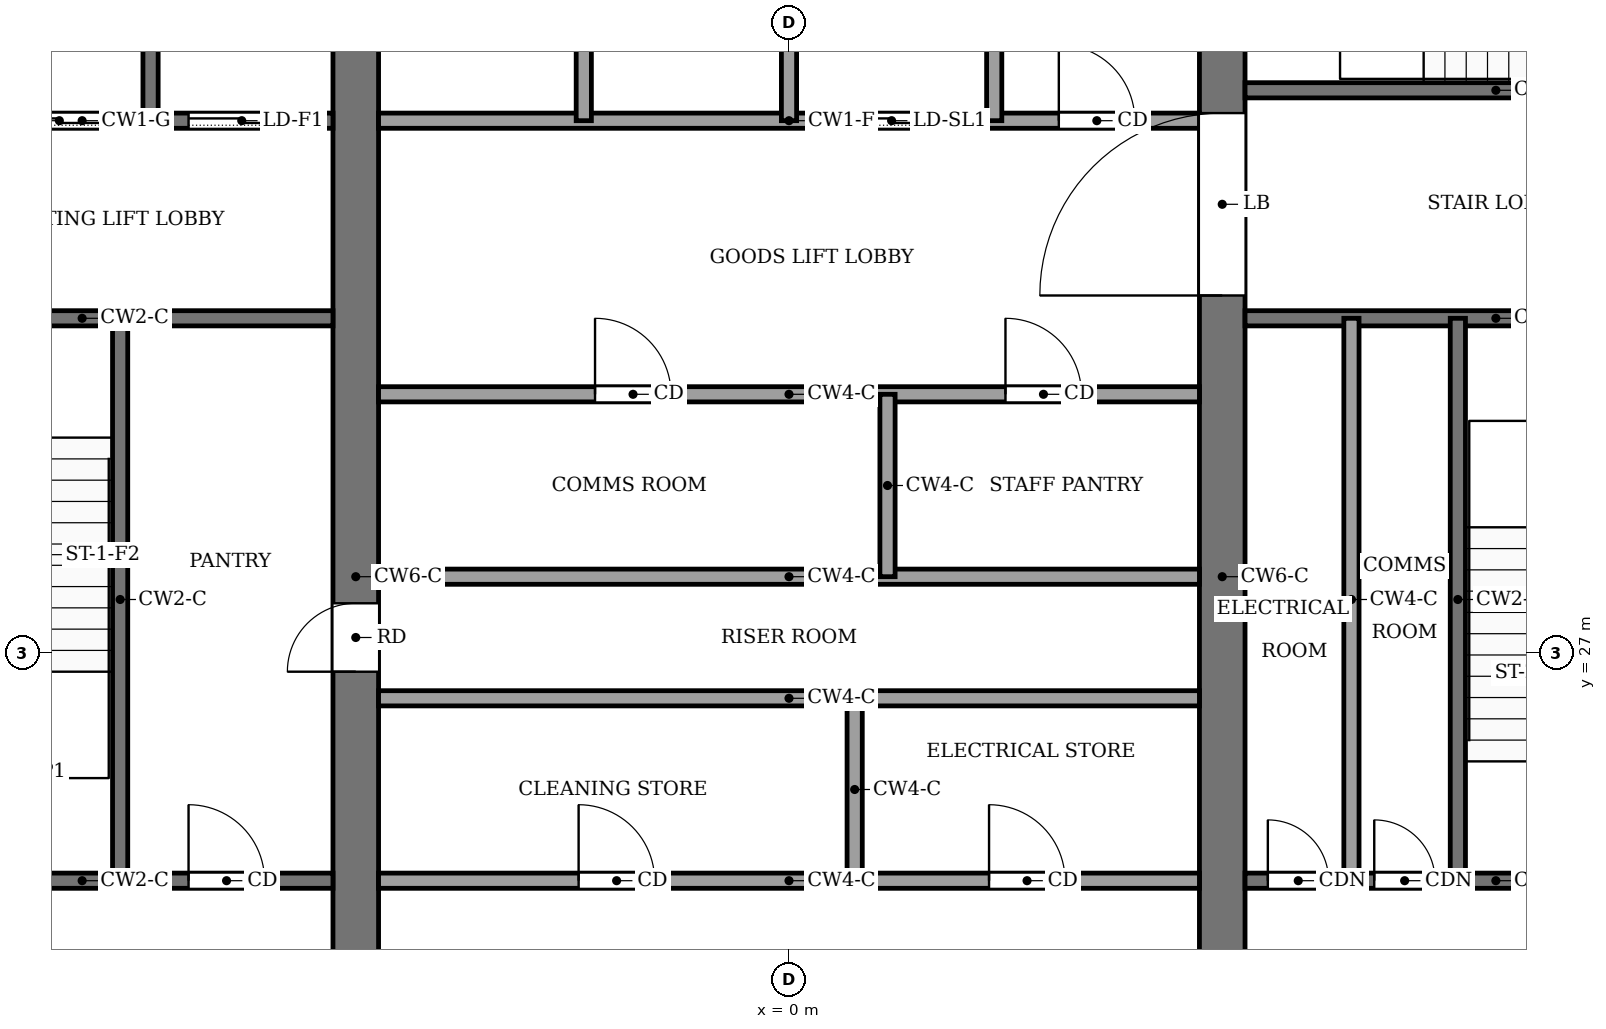
"""IFC4 building model, lengths in metres.
Left out: names, types, materials, properties, quantities, classifications, styles, units other than length and angle.
Written with IfcOpenShell. Run it as: python <this file> out.ifc"""

import sys

from ifc_helpers import new_model, si_unit, direction, frame, frame_2d, origin, place, context, subcontext, project, spatial, rectangle, extrude, element, fill, save


model = new_model("IFC4")
c1 = context("Model", 3, precision=1e-05, world=origin(), true_north=direction((0.0, 1.0)))
c2 = subcontext(c1, "Body", "Model", "MODEL_VIEW")
j1 = project(units=[si_unit("LENGTHUNIT", "METRE"), si_unit("PLANEANGLEUNIT", "RADIAN")], contexts=[c1])
p1 = place(None, origin())
s1 = spatial("IfcSite", under=j1, at=p1, CompositionType="ELEMENT")
p2 = place(p1, origin())
s2 = spatial("IfcBuilding", under=s1, at=p2, CompositionType="ELEMENT")
p3 = place(p2, frame((0.0, 0.0, 294.0)))
s3 = spatial("IfcBuildingStorey", under=s2, at=p3, CompositionType="ELEMENT", Elevation=294.0)
p4 = place(p3, frame((-5.7, 18.4, -0.13), z_axis=(0.0, 0.0, 1.0), x_axis=(0.0, 1.0, 0.0)))
e1 = element("IfcWall", 1, at=p4, inside=s3, PredefinedType="SHEAR", context=c2, shape_type="SweptSolid", body=[
    extrude(rectangle(XDim=19.2, YDim=0.6, at=frame_2d((9.6, 0.0))), origin(), (0.0, 0.0, 1.0), 4.0),
])
p5 = place(p4, frame((8.35, 0.0, 0.13)))
e2 = element("IfcOpeningElement", 2, at=p5, cuts=e1, PredefinedType="OPENING", context=c2, shape_type="SweptSolid", body=[
    extrude(rectangle(XDim=0.9, YDim=2.1, at=frame_2d((0.45, 1.05))), frame((0.0, 0.31, 0.0), z_axis=(0.0, -1.0, 0.0), x_axis=(1.0, 0.0, 0.0)), (0.0, 0.0, 1.0), 0.62),
])
p6 = place(p3, frame((5.7, 18.4, -0.13), z_axis=(0.0, 0.0, 1.0), x_axis=(0.0, 1.0, 0.0)))
e3 = element("IfcWall", 3, at=p6, inside=s3, PredefinedType="SHEAR", context=c2, shape_type="SweptSolid", body=[
    extrude(rectangle(XDim=19.2, YDim=0.6, at=frame_2d((9.6, 0.0))), origin(), (0.0, 0.0, 1.0), 4.0),
])
p7 = place(p6, frame((13.3, 0.0, 0.13)))
e4 = element("IfcOpeningElement", 4, at=p7, cuts=e3, PredefinedType="OPENING", context=c2, shape_type="SweptSolid", body=[
    extrude(rectangle(XDim=2.4, YDim=2.4, at=frame_2d((1.2, 1.2))), frame((0.0, 0.31, 0.0), z_axis=(0.0, -1.0, 0.0), x_axis=(1.0, 0.0, 0.0)), (0.0, 0.0, 1.0), 0.62),
])
p8 = place(p3, frame((-12.6, 24.0, 0.0), z_axis=(0.0, 0.0, 1.0), x_axis=(1.0, 0.0, 0.0)))
e5 = element("IfcWall", 5, at=p8, inside=s3, PredefinedType="PARTITIONING", context=c2, shape_type="SweptSolid", body=[
    extrude(rectangle(XDim=6.6, YDim=0.2, at=frame_2d((3.3, 0.0))), origin(), (0.0, 0.0, 1.0), 3.87),
])
p9 = place(p8, frame((4.7, 0.0, 0.0)))
e6 = element("IfcOpeningElement", 6, at=p9, cuts=e5, PredefinedType="OPENING", context=c2, shape_type="SweptSolid", body=[
    extrude(rectangle(XDim=1.0, YDim=2.1, at=frame_2d((0.5, 1.05))), frame((0.0, 0.11, 0.0), z_axis=(0.0, -1.0, 0.0), x_axis=(1.0, 0.0, 0.0)), (0.0, 0.0, 1.0), 0.22),
])
p10 = place(p3, frame((-5.4, 24.0, 0.0), z_axis=(0.0, 0.0, 1.0), x_axis=(1.0, 0.0, 0.0)))
e7 = element("IfcWall", 7, at=p10, inside=s3, PredefinedType="PARTITIONING", context=c2, shape_type="SweptSolid", body=[
    extrude(rectangle(XDim=10.8, YDim=0.2, at=frame_2d((5.4, 0.0))), origin(), (0.0, 0.0, 1.0), 3.87),
])
p11 = place(p10, frame((2.632, 0.0, 0.0)))
e8 = element("IfcOpeningElement", 8, at=p11, cuts=e7, PredefinedType="OPENING", context=c2, shape_type="SweptSolid", body=[
    extrude(rectangle(XDim=1.0, YDim=2.1, at=frame_2d((0.5, 1.05))), frame((0.0, 0.11, 0.0), z_axis=(0.0, -1.0, 0.0), x_axis=(1.0, 0.0, 0.0)), (0.0, 0.0, 1.0), 0.22),
])
p12 = place(p10, frame((8.032, 0.0, 0.0)))
e9 = element("IfcOpeningElement", 9, at=p12, cuts=e7, PredefinedType="OPENING", context=c2, shape_type="SweptSolid", body=[
    extrude(rectangle(XDim=1.0, YDim=2.1, at=frame_2d((0.5, 1.05))), frame((0.0, 0.11, 0.0), z_axis=(0.0, -1.0, 0.0), x_axis=(1.0, 0.0, 0.0)), (0.0, 0.0, 1.0), 0.22),
])
p13 = place(p3, frame((6.0, 24.0, 0.0), z_axis=(0.0, 0.0, 1.0), x_axis=(1.0, 0.0, 0.0)))
e10 = element("IfcWall", 10, at=p13, inside=s3, PredefinedType="PARTITIONING", context=c2, shape_type="SweptSolid", body=[
    extrude(rectangle(XDim=6.6, YDim=0.2, at=frame_2d((3.3, 0.0))), origin(), (0.0, 0.0, 1.0), 3.87),
])
p14 = place(p13, frame((0.3, 0.0, 0.0)))
e11 = element("IfcOpeningElement", 11, at=p14, cuts=e10, PredefinedType="OPENING", context=c2, shape_type="SweptSolid", body=[
    extrude(rectangle(XDim=0.8, YDim=2.1, at=frame_2d((0.4, 1.05))), frame((0.0, 0.11, 0.0), z_axis=(0.0, -1.0, 0.0), x_axis=(1.0, 0.0, 0.0)), (0.0, 0.0, 1.0), 0.22),
])
p15 = place(p13, frame((1.7, 0.0, 0.0)))
e12 = element("IfcOpeningElement", 12, at=p15, cuts=e10, PredefinedType="OPENING", context=c2, shape_type="SweptSolid", body=[
    extrude(rectangle(XDim=0.8, YDim=2.1, at=frame_2d((0.4, 1.05))), frame((0.0, 0.11, 0.0), z_axis=(0.0, -1.0, 0.0), x_axis=(1.0, 0.0, 0.0)), (0.0, 0.0, 1.0), 0.22),
])
p16 = place(p13, frame((4.4, 0.0, 0.0)))
e13 = element("IfcOpeningElement", 13, at=p16, cuts=e10, PredefinedType="OPENING", context=c2, shape_type="SweptSolid", body=[
    extrude(rectangle(XDim=1.2, YDim=2.2, at=frame_2d((0.6, 1.1))), frame((0.0, 0.11, 0.0), z_axis=(0.0, -1.0, 0.0), x_axis=(1.0, 0.0, 0.0)), (0.0, 0.0, 1.0), 0.22),
])
for number, where, z_axis, x_axis in (
    (14, (-5.4, 26.4, 0.0), (0.0, 0.0, 1.0), (1.0, 0.0, 0.0)),
    (15, (-5.4, 28.0, 0.0), (0.0, 0.0, 1.0), (1.0, 0.0, 0.0)),
):
    element("IfcWall", number, at=place(p3, frame(where, z_axis=z_axis, x_axis=x_axis)), inside=s3, PredefinedType="PARTITIONING", context=c2, shape_type="SweptSolid", body=[
        extrude(rectangle(XDim=10.8, YDim=0.2, at=frame_2d((5.4, 0.0))), origin(), (0.0, 0.0, 1.0), 3.87),
    ])
p17 = place(p3, frame((-5.4, 30.4, 0.0), z_axis=(0.0, 0.0, 1.0), x_axis=(1.0, 0.0, 0.0)))
e16 = element("IfcWall", 16, at=p17, inside=s3, PredefinedType="PARTITIONING", context=c2, shape_type="SweptSolid", body=[
    extrude(rectangle(XDim=10.8, YDim=0.2, at=frame_2d((5.4, 0.0))), origin(), (0.0, 0.0, 1.0), 3.87),
])
p18 = place(p17, frame((2.848, 0.0, 0.0)))
e17 = element("IfcOpeningElement", 17, at=p18, cuts=e16, PredefinedType="OPENING", context=c2, shape_type="SweptSolid", body=[
    extrude(rectangle(XDim=1.0, YDim=2.1, at=frame_2d((0.5, 1.05))), frame((0.0, 0.11, 0.0), z_axis=(0.0, -1.0, 0.0), x_axis=(1.0, 0.0, 0.0)), (0.0, 0.0, 1.0), 0.22),
])
p19 = place(p17, frame((8.248, 0.0, 0.0)))
e18 = element("IfcOpeningElement", 18, at=p19, cuts=e16, PredefinedType="OPENING", context=c2, shape_type="SweptSolid", body=[
    extrude(rectangle(XDim=1.0, YDim=2.1, at=frame_2d((0.5, 1.05))), frame((0.0, 0.11, 0.0), z_axis=(0.0, -1.0, 0.0), x_axis=(1.0, 0.0, 0.0)), (0.0, 0.0, 1.0), 0.22),
])
p20 = place(p3, frame((-12.6, 31.4, 0.0), z_axis=(0.0, 0.0, 1.0), x_axis=(1.0, 0.0, 0.0)))
e19 = element("IfcWall", 19, at=p20, inside=s3, PredefinedType="PARTITIONING", context=c2, shape_type="SweptSolid", body=[
    extrude(rectangle(XDim=6.6, YDim=0.2, at=frame_2d((3.3, 0.0))), origin(), (0.0, 0.0, 1.0), 3.87),
])
p21 = place(p20, frame((1.0, 0.0, 0.0)))
e20 = element("IfcOpeningElement", 20, at=p21, cuts=e19, PredefinedType="OPENING", context=c2, shape_type="SweptSolid", body=[
    extrude(rectangle(XDim=1.2, YDim=2.2, at=frame_2d((0.6, 1.1))), frame((0.0, 0.11, 0.0), z_axis=(0.0, -1.0, 0.0), x_axis=(1.0, 0.0, 0.0)), (0.0, 0.0, 1.0), 0.22),
])
p22 = place(p3, frame((6.0, 31.4, 0.0), z_axis=(0.0, 0.0, 1.0), x_axis=(1.0, 0.0, 0.0)))
e21 = element("IfcWall", 21, at=p22, inside=s3, PredefinedType="PARTITIONING", context=c2, shape_type="SweptSolid", body=[
    extrude(rectangle(XDim=6.6, YDim=0.2, at=frame_2d((3.3, 0.0))), origin(), (0.0, 0.0, 1.0), 3.87),
])
p23 = place(p3, frame((-12.6, 34.0, 0.0), z_axis=(0.0, 0.0, 1.0), x_axis=(1.0, 0.0, 0.0)))
e22 = element("IfcWall", 22, at=p23, inside=s3, PredefinedType="PARTITIONING", context=c2, shape_type="SweptSolid", body=[
    extrude(rectangle(XDim=6.6, YDim=0.2, at=frame_2d((3.3, 0.0))), origin(), (0.0, 0.0, 1.0), 3.87),
])
p24 = place(p23, frame((4.7, 0.0, 0.0)))
e23 = element("IfcOpeningElement", 23, at=p24, cuts=e22, PredefinedType="OPENING", context=c2, shape_type="SweptSolid", body=[
    extrude(rectangle(XDim=1.4, YDim=2.2, at=frame_2d((0.7, 1.1))), frame((0.0, 0.11, 0.0), z_axis=(0.0, -1.0, 0.0), x_axis=(1.0, 0.0, 0.0)), (0.0, 0.0, 1.0), 0.22),
])
p25 = place(p23, frame((2.3, 0.0, 0.0)))
e24 = element("IfcOpeningElement", 24, at=p25, cuts=e22, PredefinedType="OPENING", context=c2, shape_type="SweptSolid", body=[
    extrude(rectangle(XDim=1.4, YDim=2.2, at=frame_2d((0.7, 1.1))), frame((0.0, 0.11, 0.0), z_axis=(0.0, -1.0, 0.0), x_axis=(1.0, 0.0, 0.0)), (0.0, 0.0, 1.0), 0.22),
])
p26 = place(p23, frame((0.45, 0.0, 0.0)))
e25 = element("IfcOpeningElement", 25, at=p26, cuts=e22, PredefinedType="OPENING", context=c2, shape_type="SweptSolid", body=[
    extrude(rectangle(XDim=0.9, YDim=2.1, at=frame_2d((0.45, 1.05))), frame((0.0, 0.11, 0.0), z_axis=(0.0, -1.0, 0.0), x_axis=(1.0, 0.0, 0.0)), (0.0, 0.0, 1.0), 0.22),
])
p27 = place(p3, frame((-5.4, 34.0, 0.0), z_axis=(0.0, 0.0, 1.0), x_axis=(1.0, 0.0, 0.0)))
e26 = element("IfcWall", 26, at=p27, inside=s3, PredefinedType="PARTITIONING", context=c2, shape_type="SweptSolid", body=[
    extrude(rectangle(XDim=10.8, YDim=0.2, at=frame_2d((5.4, 0.0))), origin(), (0.0, 0.0, 1.0), 3.87),
])
p28 = place(p27, frame((6.15, 0.0, 0.0)))
e27 = element("IfcOpeningElement", 27, at=p28, cuts=e26, PredefinedType="OPENING", context=c2, shape_type="SweptSolid", body=[
    extrude(rectangle(XDim=1.2, YDim=2.2, at=frame_2d((0.6, 1.1))), frame((0.0, 0.11, 0.0), z_axis=(0.0, -1.0, 0.0), x_axis=(1.0, 0.0, 0.0)), (0.0, 0.0, 1.0), 0.22),
])
p29 = place(p27, frame((8.95, 0.0, 0.0)))
e28 = element("IfcOpeningElement", 28, at=p29, cuts=e26, PredefinedType="OPENING", context=c2, shape_type="SweptSolid", body=[
    extrude(rectangle(XDim=1.0, YDim=2.1, at=frame_2d((0.5, 1.05))), frame((0.0, 0.11, 0.0), z_axis=(0.0, -1.0, 0.0), x_axis=(1.0, 0.0, 0.0)), (0.0, 0.0, 1.0), 0.22),
])
p30 = place(p3, frame((6.0, 34.4, 0.0), z_axis=(0.0, 0.0, 1.0), x_axis=(1.0, 0.0, 0.0)))
e29 = element("IfcWall", 29, at=p30, inside=s3, PredefinedType="PARTITIONING", context=c2, shape_type="SweptSolid", body=[
    extrude(rectangle(XDim=6.6, YDim=0.2, at=frame_2d((3.3, 0.0))), origin(), (0.0, 0.0, 1.0), 3.87),
])
p31 = place(p30, frame((4.8, 0.0, 0.0)))
e30 = element("IfcOpeningElement", 30, at=p31, cuts=e29, PredefinedType="OPENING", context=c2, shape_type="SweptSolid", body=[
    extrude(rectangle(XDim=1.2, YDim=2.2, at=frame_2d((0.6, 1.1))), frame((0.0, 0.11, 0.0), z_axis=(0.0, -1.0, 0.0), x_axis=(1.0, 0.0, 0.0)), (0.0, 0.0, 1.0), 0.22),
])
p32 = place(p3, frame((-8.8, 24.0, 0.0), z_axis=(0.0, 0.0, 1.0), x_axis=(0.0, 1.0, 0.0)))
e31 = element("IfcWall", 31, at=p32, inside=s3, PredefinedType="PARTITIONING", context=c2, shape_type="SweptSolid", body=[
    extrude(rectangle(XDim=7.4, YDim=0.2, at=frame_2d((3.7, 0.0))), origin(), (0.0, 0.0, 1.0), 3.87),
])
for number, where, z_axis, x_axis in (
    (32, (-8.4, 34.0, 0.0), (0.0, 0.0, 1.0), (0.0, 1.0, 0.0)),
    (33, (-2.7, 34.0, 0.0), (0.0, 0.0, 1.0), (0.0, 1.0, 0.0)),
    (34, (0.0, 34.0, 0.0), (0.0, 0.0, 1.0), (0.0, 1.0, 0.0)),
):
    element("IfcWall", number, at=place(p3, frame(where, z_axis=z_axis, x_axis=x_axis)), inside=s3, PredefinedType="PARTITIONING", context=c2, shape_type="SweptSolid", body=[
        extrude(rectangle(XDim=3.6, YDim=0.2, at=frame_2d((1.8, 0.0))), origin(), (0.0, 0.0, 1.0), 3.87),
    ])
for number, where, z_axis, x_axis in (
    (35, (0.864, 24.0, 0.0), (0.0, 0.0, 1.0), (0.0, 1.0, 0.0)),
    (36, (1.296, 28.0, 0.0), (0.0, 0.0, 1.0), (0.0, 1.0, 0.0)),
):
    element("IfcWall", number, at=place(p3, frame(where, z_axis=z_axis, x_axis=x_axis)), inside=s3, PredefinedType="PARTITIONING", context=c2, shape_type="SweptSolid", body=[
        extrude(rectangle(XDim=2.4, YDim=0.2, at=frame_2d((1.2, 0.0))), origin(), (0.0, 0.0, 1.0), 3.87),
    ])
p33 = place(p3, frame((2.7, 34.0, 0.0), z_axis=(0.0, 0.0, 1.0), x_axis=(0.0, 1.0, 0.0)))
e37 = element("IfcWall", 37, at=p33, inside=s3, PredefinedType="PARTITIONING", context=c2, shape_type="SweptSolid", body=[
    extrude(rectangle(XDim=3.6, YDim=0.2, at=frame_2d((1.8, 0.0))), origin(), (0.0, 0.0, 1.0), 3.87),
])
for number, where, z_axis, x_axis in (
    (38, (7.4, 24.0, 0.0), (0.0, 0.0, 1.0), (0.0, 1.0, 0.0)),
    (39, (8.8, 24.0, 0.0), (0.0, 0.0, 1.0), (0.0, 1.0, 0.0)),
):
    element("IfcWall", number, at=place(p3, frame(where, z_axis=z_axis, x_axis=x_axis)), inside=s3, PredefinedType="PARTITIONING", context=c2, shape_type="SweptSolid", body=[
        extrude(rectangle(XDim=7.4, YDim=0.2, at=frame_2d((3.7, 0.0))), origin(), (0.0, 0.0, 1.0), 3.87),
    ])
p34 = place(p28, origin())
e40 = element("IfcDoor", 40, at=p34, inside=s3, OperationType="SLIDING_TO_LEFT", PredefinedType="DOOR", context=c2, shape_type="SweptSolid", body=[
    extrude(rectangle(XDim=1.2, YDim=2.2, at=frame_2d((0.6, 1.1))), frame((0.0, 0.025, 0.0), z_axis=(0.0, -1.0, 0.0), x_axis=(1.0, 0.0, 0.0)), (0.0, 0.0, 1.0), 0.05),
])
fill(e27, e40)
p35 = place(p24, origin())
e41 = element("IfcDoor", 41, at=p35, inside=s3, OperationType="SLIDING_TO_LEFT", PredefinedType="DOOR", context=c2, shape_type="SweptSolid", body=[
    extrude(rectangle(XDim=1.4, YDim=2.2, at=frame_2d((0.7, 1.1))), frame((0.0, 0.025, 0.0), z_axis=(0.0, -1.0, 0.0), x_axis=(1.0, 0.0, 0.0)), (0.0, 0.0, 1.0), 0.05),
])
fill(e23, e41)
p36 = place(p25, origin())
e42 = element("IfcDoor", 42, at=p36, inside=s3, OperationType="SLIDING_TO_LEFT", PredefinedType="DOOR", context=c2, shape_type="SweptSolid", body=[
    extrude(rectangle(XDim=1.4, YDim=2.2, at=frame_2d((0.7, 1.1))), frame((0.0, 0.025, 0.0), z_axis=(0.0, -1.0, 0.0), x_axis=(1.0, 0.0, 0.0)), (0.0, 0.0, 1.0), 0.05),
])
fill(e24, e42)
p37 = place(p11, origin())
e43 = element("IfcDoor", 43, at=p37, inside=s3, OperationType="SINGLE_SWING_LEFT", PredefinedType="DOOR", context=c2, shape_type="SweptSolid", body=[
    extrude(rectangle(XDim=1.0, YDim=2.1, at=frame_2d((0.5, 1.05))), frame((0.0, 0.025, 0.0), z_axis=(0.0, -1.0, 0.0), x_axis=(1.0, 0.0, 0.0)), (0.0, 0.0, 1.0), 0.05),
])
fill(e8, e43)
p38 = place(p12, origin())
e44 = element("IfcDoor", 44, at=p38, inside=s3, OperationType="SINGLE_SWING_RIGHT", PredefinedType="DOOR", context=c2, shape_type="SweptSolid", body=[
    extrude(rectangle(XDim=1.0, YDim=2.1, at=frame_2d((0.5, 1.05))), frame((0.0, 0.025, 0.0), z_axis=(0.0, -1.0, 0.0), x_axis=(1.0, 0.0, 0.0)), (0.0, 0.0, 1.0), 0.05),
])
fill(e9, e44)
p39 = place(p18, origin())
e45 = element("IfcDoor", 45, at=p39, inside=s3, OperationType="SINGLE_SWING_LEFT", PredefinedType="DOOR", context=c2, shape_type="SweptSolid", body=[
    extrude(rectangle(XDim=1.0, YDim=2.1, at=frame_2d((0.5, 1.05))), frame((0.0, 0.025, 0.0), z_axis=(0.0, -1.0, 0.0), x_axis=(1.0, 0.0, 0.0)), (0.0, 0.0, 1.0), 0.05),
])
fill(e17, e45)
p40 = place(p19, origin())
e46 = element("IfcDoor", 46, at=p40, inside=s3, OperationType="SINGLE_SWING_RIGHT", PredefinedType="DOOR", context=c2, shape_type="SweptSolid", body=[
    extrude(rectangle(XDim=1.0, YDim=2.1, at=frame_2d((0.5, 1.05))), frame((0.0, 0.025, 0.0), z_axis=(0.0, -1.0, 0.0), x_axis=(1.0, 0.0, 0.0)), (0.0, 0.0, 1.0), 0.05),
])
fill(e18, e46)
p41 = place(p9, origin())
e47 = element("IfcDoor", 47, at=p41, inside=s3, OperationType="SINGLE_SWING_RIGHT", PredefinedType="DOOR", context=c2, shape_type="SweptSolid", body=[
    extrude(rectangle(XDim=1.0, YDim=2.1, at=frame_2d((0.5, 1.05))), frame((0.0, 0.025, 0.0), z_axis=(0.0, -1.0, 0.0), x_axis=(1.0, 0.0, 0.0)), (0.0, 0.0, 1.0), 0.05),
])
fill(e6, e47)
p42 = place(p14, origin())
e48 = element("IfcDoor", 48, at=p42, inside=s3, OperationType="SINGLE_SWING_RIGHT", PredefinedType="DOOR", context=c2, shape_type="SweptSolid", body=[
    extrude(rectangle(XDim=0.8, YDim=2.1, at=frame_2d((0.4, 1.05))), frame((0.0, 0.025, 0.0), z_axis=(0.0, -1.0, 0.0), x_axis=(1.0, 0.0, 0.0)), (0.0, 0.0, 1.0), 0.05),
])
fill(e11, e48)
p43 = place(p15, origin())
e49 = element("IfcDoor", 49, at=p43, inside=s3, OperationType="SINGLE_SWING_LEFT", PredefinedType="DOOR", context=c2, shape_type="SweptSolid", body=[
    extrude(rectangle(XDim=0.8, YDim=2.1, at=frame_2d((0.4, 1.05))), frame((0.0, 0.025, 0.0), z_axis=(0.0, -1.0, 0.0), x_axis=(1.0, 0.0, 0.0)), (0.0, 0.0, 1.0), 0.05),
])
fill(e12, e49)
p44 = place(p29, origin())
e50 = element("IfcDoor", 50, at=p44, inside=s3, OperationType="SINGLE_SWING_LEFT", PredefinedType="DOOR", context=c2, shape_type="SweptSolid", body=[
    extrude(rectangle(XDim=1.0, YDim=2.1, at=frame_2d((0.5, 1.05))), frame((0.0, 0.025, 0.0), z_axis=(0.0, -1.0, 0.0), x_axis=(1.0, 0.0, 0.0)), (0.0, 0.0, 1.0), 0.05),
])
fill(e28, e50)
p45 = place(p5, origin())
e51 = element("IfcDoor", 51, at=p45, inside=s3, OperationType="SINGLE_SWING_LEFT", PredefinedType="DOOR", context=c2, shape_type="SweptSolid", body=[
    extrude(rectangle(XDim=0.9, YDim=2.1, at=frame_2d((0.45, 1.05))), frame((0.0, 0.025, 0.0), z_axis=(0.0, -1.0, 0.0), x_axis=(1.0, 0.0, 0.0)), (0.0, 0.0, 1.0), 0.05),
])
fill(e2, e51)
p46 = place(p7, origin())
e52 = element("IfcDoor", 52, at=p46, inside=s3, OperationType="DOUBLE_DOOR_SINGLE_SWING", PredefinedType="DOOR", context=c2, shape_type="SweptSolid", body=[
    extrude(rectangle(XDim=2.4, YDim=2.4, at=frame_2d((1.2, 1.2))), frame((0.0, 0.025, 0.0), z_axis=(0.0, -1.0, 0.0), x_axis=(1.0, 0.0, 0.0)), (0.0, 0.0, 1.0), 0.05),
])
fill(e4, e52)
save(model, sys.argv[1])
